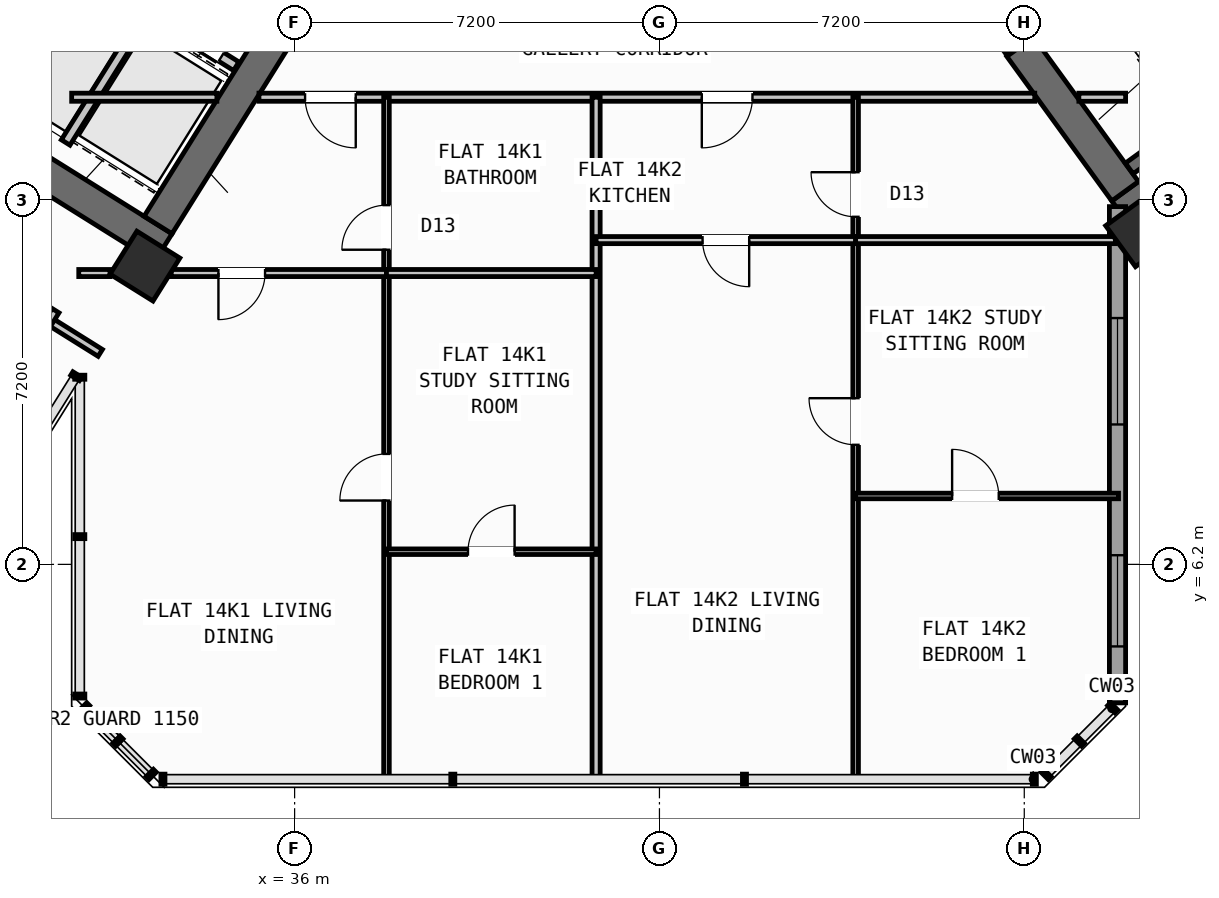
"""IFC4 building model, lengths in metres.
Left out: names, types, materials, properties, quantities, classifications, styles, units other than length and angle.
Written with IfcOpenShell. Run it as: python <this file> out.ifc"""

import sys

from ifc_helpers import new_model, si_unit, direction, frame, frame_2d, origin, origin_2d, place, context, subcontext, project, spatial, rectangle, hollow_rectangle, extrude, source, transform, mapped, element, fill, save


model = new_model("IFC4")
c1 = context("Model", 3, precision=1e-05, world=origin(), true_north=direction((0.0, 1.0)))
c2 = subcontext(c1, "Body", "Model", "MODEL_VIEW")
j1 = project(units=[si_unit("LENGTHUNIT", "METRE"), si_unit("PLANEANGLEUNIT", "RADIAN")], contexts=[c1])
p1 = place(None, origin())
s1 = spatial("IfcSite", under=j1, at=p1, CompositionType="ELEMENT")
p2 = place(p1, origin())
s2 = spatial("IfcBuilding", under=s1, at=p2, CompositionType="ELEMENT")
p3 = place(p2, frame((0.0, 0.0, 56.4)))
s3 = spatial("IfcBuildingStorey", under=s2, at=p3, CompositionType="ELEMENT", Elevation=56.4)
p4 = place(p3, frame((33.409, 12.45, 0.0), z_axis=(0.0, 0.0, 1.0), x_axis=(-0.848051132073, 0.529914405721, 0.0)))
e1 = element("IfcWall", 1, at=p4, inside=s3, PredefinedType="SHEAR", context=c2, shape_type="SweptSolid", body=[
    extrude(rectangle(XDim=13.24, YDim=0.65, at=frame_2d((6.62, 0.0))), origin(), (0.0, 0.0, 1.0), 3.35),
])
p5 = place(p3, frame((36.683, 18.304, 0.0), z_axis=(0.0, 0.0, 1.0), x_axis=(-0.529899109053, -0.848060690178, 0.0)))
e2 = element("IfcWall", 2, at=p5, inside=s3, PredefinedType="SHEAR", context=c2, shape_type="SweptSolid", body=[
    extrude(rectangle(XDim=6.375, YDim=0.65, at=frame_2d((3.188, 0.0))), origin(), (0.0, 0.0, 1.0), 3.35),
])
p6 = place(p3, frame((52.318, 13.11, 0.0), z_axis=(0.0, 0.0, 1.0), x_axis=(0.809019445368, 0.587781878776, 0.0)))
e3 = element("IfcWall", 3, at=p6, inside=s3, PredefinedType="SHEAR", context=c2, shape_type="SweptSolid", body=[
    extrude(rectangle(XDim=12.44, YDim=0.65, at=frame_2d((6.22, 0.0))), origin(), (0.0, 0.0, 1.0), 3.35),
])
p7 = place(p3, frame((52.39, 13.564, 0.0), z_axis=(0.0, 0.0, 1.0), x_axis=(-0.58779688989, 0.809008539037, 0.0)))
e4 = element("IfcWall", 4, at=p7, inside=s3, PredefinedType="SHEAR", context=c2, shape_type="SweptSolid", body=[
    extrude(rectangle(XDim=3.525, YDim=0.65, at=frame_2d((1.763, 0.0))), origin(), (0.0, 0.0, 1.0), 3.35),
])
m1 = source(origin(), c2, "Body", "SweptSolid", [
    extrude(hollow_rectangle(XDim=1.0, YDim=1.0, WallThickness=0.04, at=origin_2d()), origin(), (0.0, 0.0, 1.0), 3.6),
])
for number, where, z_axis, x_axis in (
    (5, (33.046, 12.087, 0.0), (0.0, 0.0, 1.0), (-0.848, 0.53, 0.0)),
    (6, (52.705, 12.773, 0.0), (0.0, 0.0, 1.0), (0.809, 0.588, 0.0)),
):
    element("IfcColumn", number, at=place(p3, frame(where, z_axis=z_axis, x_axis=x_axis)), inside=s3, PredefinedType="COLUMN", context=c2, shape_type="MappedRepresentation", body=[
        mapped(m1, transform((0.0, 0.0, 0.0), scale=1.0)),
    ])
p8 = place(p3, frame((56.581, 7.439, 0.0), z_axis=(0.0, 0.0, 1.0), x_axis=(-0.587785875463, 0.809016541614, 0.0)))
e7 = element("IfcWall", 7, at=p8, inside=s3, PredefinedType="STANDARD", context=c2, shape_type="SweptSolid", body=[
    extrude(rectangle(XDim=6.774, YDim=0.32, at=frame_2d((3.387, 0.0))), origin(), (0.0, 0.0, 1.0), 2.725),
])
p9 = place(p8, frame((1.556, 0.0, 0.8)))
e8 = element("IfcOpeningElement", 8, at=p9, cuts=e7, PredefinedType="OPENING", context=c2, shape_type="SweptSolid", body=[
    extrude(rectangle(XDim=2.1, YDim=1.55, at=frame_2d((1.05, 0.775))), frame((0.0, 0.17, 0.0), z_axis=(0.0, -1.0, 0.0), x_axis=(1.0, 0.0, 0.0)), (0.0, 0.0, 1.0), 0.34),
])
p10 = place(p3, frame((52.24, 13.261, 0.0), z_axis=(0.0, 0.0, 1.0), x_axis=(0.0, -1.0, 0.0)))
e9 = element("IfcWall", 9, at=p10, inside=s3, PredefinedType="STANDARD", context=c2, shape_type="SweptSolid", body=[
    extrude(rectangle(XDim=9.795, YDim=0.32, at=frame_2d((4.897, 0.0))), origin(), (0.0, 0.0, 1.0), 3.35),
])
p11 = place(p10, frame((2.199, 0.0, 0.8)))
e10 = element("IfcOpeningElement", 10, at=p11, cuts=e9, PredefinedType="OPENING", context=c2, shape_type="SweptSolid", body=[
    extrude(rectangle(XDim=2.1, YDim=1.55, at=frame_2d((1.05, 0.775))), frame((0.0, 0.17, 0.0), z_axis=(0.0, -1.0, 0.0), x_axis=(1.0, 0.0, 0.0)), (0.0, 0.0, 1.0), 0.34),
])
p12 = place(p10, frame((6.88, 0.0, 0.85)))
e11 = element("IfcOpeningElement", 11, at=p12, cuts=e9, PredefinedType="OPENING", context=c2, shape_type="SweptSolid", body=[
    extrude(rectangle(XDim=1.8, YDim=1.5, at=frame_2d((0.9, 0.75))), frame((0.0, 0.17, 0.0), z_axis=(0.0, -1.0, 0.0), x_axis=(1.0, 0.0, 0.0)), (0.0, 0.0, 1.0), 0.34),
])
p13 = place(p3, frame((31.288, 18.256, 0.0), z_axis=(0.0, 0.0, 1.0), x_axis=(-0.529943379326, -0.848033026897, 0.0)))
e12 = element("IfcWall", 12, at=p13, inside=s3, PredefinedType="SHEAR", context=c2, shape_type="SweptSolid", body=[
    extrude(rectangle(XDim=3.16, YDim=0.26, at=frame_2d((1.58, 0.0))), origin(), (0.0, 0.0, 1.0), 3.35),
])
p14 = place(p3, frame((34.848, 16.031, 0.0), z_axis=(0.0, 0.0, 1.0), x_axis=(-0.848044042236, 0.529925751807, 0.0)))
e13 = element("IfcWall", 13, at=p14, inside=s3, PredefinedType="STANDARD", context=c2, shape_type="SweptSolid", body=[
    extrude(rectangle(XDim=4.198, YDim=0.2, at=frame_2d((2.099, 0.0))), origin(), (0.0, 0.0, 1.0), 3.34),
])
p15 = place(p14, frame((0.348, 0.0, 0.0)))
e14 = element("IfcOpeningElement", 14, at=p15, cuts=e13, PredefinedType="OPENING", context=c2, shape_type="SweptSolid", body=[
    extrude(rectangle(XDim=1.3, YDim=2.2, at=frame_2d((0.65, 1.1))), frame((0.0, 0.11, 0.0), z_axis=(0.0, -1.0, 0.0), x_axis=(1.0, 0.0, 0.0)), (0.0, 0.0, 1.0), 0.22),
])
p16 = place(p14, frame((2.423, 0.0, 0.0)))
e15 = element("IfcOpeningElement", 15, at=p16, cuts=e13, PredefinedType="OPENING", context=c2, shape_type="SweptSolid", body=[
    extrude(rectangle(XDim=1.45, YDim=2.25, at=frame_2d((0.725, 1.125))), frame((0.0, 0.11, 0.0), z_axis=(0.0, -1.0, 0.0), x_axis=(1.0, 0.0, 0.0)), (0.0, 0.0, 1.0), 0.22),
])
p17 = place(p3, frame((33.029, 17.003, 0.0), z_axis=(0.0, 0.0, 1.0), x_axis=(-0.529916267533, -0.848049968695, 0.0)))
e16 = element("IfcWall", 16, at=p17, inside=s3, PredefinedType="STANDARD", context=c2, shape_type="SweptSolid", body=[
    extrude(rectangle(XDim=2.92, YDim=0.2, at=frame_2d((1.46, 0.0))), origin(), (0.0, 0.0, 1.0), 3.34),
])
p18 = place(p3, frame((52.472, 14.013, 0.0), z_axis=(0.0, 0.0, 1.0), x_axis=(0.809028366311, 0.587769599847, 0.0)))
e17 = element("IfcWall", 17, at=p18, inside=s3, PredefinedType="SHEAR", context=c2, shape_type="SweptSolid", body=[
    extrude(rectangle(XDim=7.33, YDim=0.26, at=frame_2d((3.665, 0.0))), origin(), (0.0, 0.0, 1.0), 3.35),
])
p19 = place(p3, frame((32.164, 10.374, 0.0), z_axis=(0.0, 0.0, 1.0), x_axis=(-0.848044107957, 0.529925646633, 0.0)))
e18 = element("IfcWall", 18, at=p19, inside=s3, PredefinedType="PARTITIONING", context=c2, shape_type="SweptSolid", body=[
    extrude(rectangle(XDim=15.57, YDim=0.16, at=frame_2d((7.785, 0.0))), origin(), (0.0, 0.0, 1.0), 3.34),
])
p20 = place(p19, frame((10.83, 0.0, 0.0)))
e19 = element("IfcOpeningElement", 19, at=p20, cuts=e18, PredefinedType="OPENING", context=c2, shape_type="SweptSolid", body=[
    extrude(rectangle(XDim=1.0, YDim=2.1, at=frame_2d((0.5, 1.05))), frame((0.0, 0.09, 0.0), z_axis=(0.0, -1.0, 0.0), x_axis=(1.0, 0.0, 0.0)), (0.0, 0.0, 1.0), 0.18),
])
p21 = place(p3, frame((31.282, 11.208, 0.0), z_axis=(0.0, 0.0, 1.0), x_axis=(-0.529938869374, -0.84803584519, 0.0)))
e20 = element("IfcWall", 20, at=p21, inside=s3, PredefinedType="PARTITIONING", context=c2, shape_type="SweptSolid", body=[
    extrude(rectangle(XDim=5.48, YDim=0.16, at=frame_2d((2.74, 0.0))), origin(), (0.0, 0.0, 1.0), 3.34),
])
p22 = place(p3, frame((31.6, 15.42, 0.0), z_axis=(0.0, 0.0, 1.0), x_axis=(1.0, 0.0, 0.0)))
e21 = element("IfcWall", 21, at=p22, inside=s3, PredefinedType="PARTITIONING", context=c2, shape_type="SweptSolid", body=[
    extrude(rectangle(XDim=2.866, YDim=0.16, at=frame_2d((1.433, 0.0))), origin(), (0.0, 0.0, 1.0), 3.34),
])
p23 = place(p3, frame((35.296, 15.42, 0.0), z_axis=(0.0, 0.0, 1.0), x_axis=(1.0, 0.0, 0.0)))
e22 = element("IfcWall", 22, at=p23, inside=s3, PredefinedType="PARTITIONING", context=c2, shape_type="SweptSolid", body=[
    extrude(rectangle(XDim=15.311, YDim=0.16, at=frame_2d((7.655, 0.0))), origin(), (0.0, 0.0, 1.0), 3.34),
])
p24 = place(p23, frame((0.91, 0.0, 0.0)))
e23 = element("IfcOpeningElement", 23, at=p24, cuts=e22, PredefinedType="OPENING", context=c2, shape_type="SweptSolid", body=[
    extrude(rectangle(XDim=1.0, YDim=2.1, at=frame_2d((0.5, 1.05))), frame((0.0, 0.09, 0.0), z_axis=(0.0, -1.0, 0.0), x_axis=(1.0, 0.0, 0.0)), (0.0, 0.0, 1.0), 0.18),
])
p25 = place(p23, frame((8.74, 0.0, 0.0)))
e24 = element("IfcOpeningElement", 24, at=p25, cuts=e22, PredefinedType="OPENING", context=c2, shape_type="SweptSolid", body=[
    extrude(rectangle(XDim=1.0, YDim=2.1, at=frame_2d((0.5, 1.05))), frame((0.0, 0.09, 0.0), z_axis=(0.0, -1.0, 0.0), x_axis=(1.0, 0.0, 0.0)), (0.0, 0.0, 1.0), 0.18),
])
p26 = place(p3, frame((51.477, 15.42, 0.0), z_axis=(0.0, 0.0, 1.0), x_axis=(1.0, 0.0, 0.0)))
e25 = element("IfcWall", 25, at=p26, inside=s3, PredefinedType="PARTITIONING", context=c2, shape_type="SweptSolid", body=[
    extrude(rectangle(XDim=0.923, YDim=0.16, at=frame_2d((0.461, 0.0))), origin(), (0.0, 0.0, 1.0), 3.34),
])
p27 = place(p3, frame((50.119, 16.333, 0.0), z_axis=(0.0, 0.0, 1.0), x_axis=(-0.587749856981, 0.809042709391, 0.0)))
e26 = element("IfcWall", 26, at=p27, inside=s3, PredefinedType="STANDARD", context=c2, shape_type="SweptSolid", body=[
    extrude(rectangle(XDim=2.96, YDim=0.2, at=frame_2d((1.48, 0.0))), origin(), (0.0, 0.0, 1.0), 3.34),
])
p28 = place(p27, frame((0.53, 0.0, 0.0)))
e27 = element("IfcOpeningElement", 27, at=p28, cuts=e26, PredefinedType="OPENING", context=c2, shape_type="SweptSolid", body=[
    extrude(rectangle(XDim=1.5, YDim=2.15, at=frame_2d((0.75, 1.075))), frame((0.0, 0.11, 0.0), z_axis=(0.0, -1.0, 0.0), x_axis=(1.0, 0.0, 0.0)), (0.0, 0.0, 1.0), 0.22),
])
p29 = place(p3, frame((41.95, 1.96, 0.0), z_axis=(0.0, 0.0, 1.0), x_axis=(0.0, 1.0, 0.0)))
e28 = element("IfcWall", 28, at=p29, inside=s3, PredefinedType="PARTITIONING", context=c2, shape_type="SweptSolid", body=[
    extrude(rectangle(XDim=13.46, YDim=0.16, at=frame_2d((6.73, 0.0))), origin(), (0.0, 0.0, 1.0), 3.34),
])
p30 = place(p3, frame((37.813, 1.96, 0.0), z_axis=(0.0, 0.0, 1.0), x_axis=(0.0, 1.0, 0.0)))
e29 = element("IfcWall", 29, at=p30, inside=s3, PredefinedType="PARTITIONING", context=c2, shape_type="SweptSolid", body=[
    extrude(rectangle(XDim=13.46, YDim=0.11, at=frame_2d((6.73, 0.0))), origin(), (0.0, 0.0, 1.0), 3.34),
])
p31 = place(p30, frame((5.5, 0.0, 0.0)))
e30 = element("IfcOpeningElement", 30, at=p31, cuts=e29, PredefinedType="OPENING", context=c2, shape_type="SweptSolid", body=[
    extrude(rectangle(XDim=0.92, YDim=2.08, at=frame_2d((0.46, 1.04))), frame((0.0, 0.065, 0.0), z_axis=(0.0, -1.0, 0.0), x_axis=(1.0, 0.0, 0.0)), (0.0, 0.0, 1.0), 0.13),
])
p32 = place(p30, frame((10.45, 0.0, 0.0)))
e31 = element("IfcOpeningElement", 31, at=p32, cuts=e29, PredefinedType="OPENING", context=c2, shape_type="SweptSolid", body=[
    extrude(rectangle(XDim=0.88, YDim=2.08, at=frame_2d((0.44, 1.04))), frame((0.0, 0.065, 0.0), z_axis=(0.0, -1.0, 0.0), x_axis=(1.0, 0.0, 0.0)), (0.0, 0.0, 1.0), 0.13),
])
p33 = place(p3, frame((31.74, 11.95, 0.0), z_axis=(0.0, 0.0, 1.0), x_axis=(1.0, 0.0, 0.0)))
e32 = element("IfcWall", 32, at=p33, inside=s3, PredefinedType="PLUMBINGWALL", context=c2, shape_type="SweptSolid", body=[
    extrude(rectangle(XDim=0.617, YDim=0.14, at=frame_2d((0.309, 0.0))), origin(), (0.0, 0.0, 1.0), 3.34),
])
p34 = place(p3, frame((33.564, 11.95, 0.0), z_axis=(0.0, 0.0, 1.0), x_axis=(1.0, 0.0, 0.0)))
e33 = element("IfcWall", 33, at=p34, inside=s3, PredefinedType="PLUMBINGWALL", context=c2, shape_type="SweptSolid", body=[
    extrude(rectangle(XDim=4.249, YDim=0.14, at=frame_2d((2.124, 0.0))), origin(), (0.0, 0.0, 1.0), 2.525),
])
p35 = place(p34, frame((0.932, 0.0, 0.0)))
e34 = element("IfcOpeningElement", 34, at=p35, cuts=e33, PredefinedType="OPENING", context=c2, shape_type="SweptSolid", body=[
    extrude(rectangle(XDim=0.92, YDim=2.08, at=frame_2d((0.46, 1.04))), frame((0.0, 0.08, 0.0), z_axis=(0.0, -1.0, 0.0), x_axis=(1.0, 0.0, 0.0)), (0.0, 0.0, 1.0), 0.16),
])
p36 = place(p3, frame((37.813, 11.95, 0.0), z_axis=(0.0, 0.0, 1.0), x_axis=(1.0, 0.0, 0.0)))
e35 = element("IfcWall", 35, at=p36, inside=s3, PredefinedType="PLUMBINGWALL", context=c2, shape_type="SweptSolid", body=[
    extrude(rectangle(XDim=4.137, YDim=0.14, at=frame_2d((2.068, 0.0))), origin(), (0.0, 0.0, 1.0), 2.525),
])
p37 = place(p3, frame((37.813, 6.45, 0.0), z_axis=(0.0, 0.0, 1.0), x_axis=(1.0, 0.0, 0.0)))
e36 = element("IfcWall", 36, at=p37, inside=s3, PredefinedType="PARTITIONING", context=c2, shape_type="SweptSolid", body=[
    extrude(rectangle(XDim=4.137, YDim=0.11, at=frame_2d((2.068, 0.0))), origin(), (0.0, 0.0, 1.0), 3.34),
])
p38 = place(p37, frame((1.608, 0.0, 0.0)))
e37 = element("IfcOpeningElement", 37, at=p38, cuts=e36, PredefinedType="OPENING", context=c2, shape_type="SweptSolid", body=[
    extrude(rectangle(XDim=0.92, YDim=2.08, at=frame_2d((0.46, 1.04))), frame((0.0, 0.065, 0.0), z_axis=(0.0, -1.0, 0.0), x_axis=(1.0, 0.0, 0.0)), (0.0, 0.0, 1.0), 0.13),
])
p39 = place(p3, frame((47.072, 1.96, 0.0), z_axis=(0.0, 0.0, 1.0), x_axis=(0.0, 1.0, 0.0)))
e38 = element("IfcWall", 38, at=p39, inside=s3, PredefinedType="PARTITIONING", context=c2, shape_type="SweptSolid", body=[
    extrude(rectangle(XDim=13.46, YDim=0.11, at=frame_2d((6.73, 0.0))), origin(), (0.0, 0.0, 1.0), 3.34),
])
p40 = place(p39, frame((6.6, 0.0, 0.0)))
e39 = element("IfcOpeningElement", 39, at=p40, cuts=e38, PredefinedType="OPENING", context=c2, shape_type="SweptSolid", body=[
    extrude(rectangle(XDim=0.92, YDim=2.08, at=frame_2d((0.46, 1.04))), frame((0.0, 0.065, 0.0), z_axis=(0.0, -1.0, 0.0), x_axis=(1.0, 0.0, 0.0)), (0.0, 0.0, 1.0), 0.13),
])
p41 = place(p39, frame((11.1, 0.0, 0.0)))
e40 = element("IfcOpeningElement", 40, at=p41, cuts=e38, PredefinedType="OPENING", context=c2, shape_type="SweptSolid", body=[
    extrude(rectangle(XDim=0.88, YDim=2.08, at=frame_2d((0.44, 1.04))), frame((0.0, 0.065, 0.0), z_axis=(0.0, -1.0, 0.0), x_axis=(1.0, 0.0, 0.0)), (0.0, 0.0, 1.0), 0.13),
])
p42 = place(p3, frame((41.95, 12.6, 0.0), z_axis=(0.0, 0.0, 1.0), x_axis=(1.0, 0.0, 0.0)))
e41 = element("IfcWall", 41, at=p42, inside=s3, PredefinedType="PLUMBINGWALL", context=c2, shape_type="SweptSolid", body=[
    extrude(rectangle(XDim=5.122, YDim=0.14, at=frame_2d((2.561, 0.0))), origin(), (0.0, 0.0, 1.0), 2.525),
])
p43 = place(p42, frame((2.101, 0.0, 0.0)))
e42 = element("IfcOpeningElement", 42, at=p43, cuts=e41, PredefinedType="OPENING", context=c2, shape_type="SweptSolid", body=[
    extrude(rectangle(XDim=0.92, YDim=2.08, at=frame_2d((0.46, 1.04))), frame((0.0, 0.08, 0.0), z_axis=(0.0, -1.0, 0.0), x_axis=(1.0, 0.0, 0.0)), (0.0, 0.0, 1.0), 0.16),
])
p44 = place(p3, frame((47.072, 12.6, 0.0), z_axis=(0.0, 0.0, 1.0), x_axis=(1.0, 0.0, 0.0)))
e43 = element("IfcWall", 43, at=p44, inside=s3, PredefinedType="PLUMBINGWALL", context=c2, shape_type="SweptSolid", body=[
    extrude(rectangle(XDim=5.126, YDim=0.14, at=frame_2d((2.563, 0.0))), origin(), (0.0, 0.0, 1.0), 2.525),
])
p45 = place(p3, frame((47.072, 7.55, 0.0), z_axis=(0.0, 0.0, 1.0), x_axis=(1.0, 0.0, 0.0)))
e44 = element("IfcWall", 44, at=p45, inside=s3, PredefinedType="PARTITIONING", context=c2, shape_type="SweptSolid", body=[
    extrude(rectangle(XDim=5.188, YDim=0.11, at=frame_2d((2.594, 0.0))), origin(), (0.0, 0.0, 1.0), 3.34),
])
p46 = place(p45, frame((1.904, 0.0, 0.0)))
e45 = element("IfcOpeningElement", 45, at=p46, cuts=e44, PredefinedType="OPENING", context=c2, shape_type="SweptSolid", body=[
    extrude(rectangle(XDim=0.92, YDim=2.08, at=frame_2d((0.46, 1.04))), frame((0.0, 0.065, 0.0), z_axis=(0.0, -1.0, 0.0), x_axis=(1.0, 0.0, 0.0)), (0.0, 0.0, 1.0), 0.13),
])
m2 = source(origin(), c2, "Body", "SweptSolid", [
    extrude(rectangle(XDim=2.1, YDim=1.55, at=frame_2d((1.05, 0.775))), frame((0.0, 0.03, 0.0), z_axis=(0.0, -1.0, 0.0), x_axis=(1.0, 0.0, 0.0)), (0.0, 0.0, 1.0), 0.06),
])
p47 = place(p11, origin())
e46 = element("IfcWindow", 46, at=p47, inside=s3, PartitioningType="SINGLE_PANEL", PredefinedType="WINDOW", context=c2, shape_type="MappedRepresentation", body=[
    mapped(m2, transform((0.0, 0.0, 0.0), scale=1.0)),
])
fill(e10, e46)
m3 = source(origin(), c2, "Body", "SweptSolid", [
    extrude(rectangle(XDim=1.8, YDim=1.5, at=frame_2d((0.9, 0.75))), frame((0.0, 0.03, 0.0), z_axis=(0.0, -1.0, 0.0), x_axis=(1.0, 0.0, 0.0)), (0.0, 0.0, 1.0), 0.06),
])
p48 = place(p12, origin())
e47 = element("IfcWindow", 47, at=p48, inside=s3, PartitioningType="SINGLE_PANEL", PredefinedType="WINDOW", context=c2, shape_type="MappedRepresentation", body=[
    mapped(m3, transform((0.0, 0.0, 0.0), scale=1.0)),
])
fill(e11, e47)
m4 = source(origin(), c2, "Body", "SweptSolid", [
    extrude(rectangle(XDim=1.3, YDim=2.2, at=frame_2d((0.65, 1.1))), frame((0.0, 0.025, 0.0), z_axis=(0.0, -1.0, 0.0), x_axis=(1.0, 0.0, 0.0)), (0.0, 0.0, 1.0), 0.05),
])
p49 = place(p15, origin())
e48 = element("IfcDoor", 48, at=p49, inside=s3, OperationType="DOUBLE_DOOR_SLIDING", PredefinedType="DOOR", context=c2, shape_type="MappedRepresentation", body=[
    mapped(m4, transform((0.0, 0.0, 0.0), scale=1.0)),
])
fill(e14, e48)
m5 = source(origin(), c2, "Body", "SweptSolid", [
    extrude(rectangle(XDim=0.92, YDim=2.08, at=frame_2d((0.46, 1.04))), frame((0.0, 0.025, 0.0), z_axis=(0.0, -1.0, 0.0), x_axis=(1.0, 0.0, 0.0)), (0.0, 0.0, 1.0), 0.05),
])
p50 = place(p31, origin())
e49 = element("IfcDoor", 49, at=p50, inside=s3, OperationType="SINGLE_SWING_LEFT", PredefinedType="DOOR", context=c2, shape_type="MappedRepresentation", body=[
    mapped(m5, transform((0.0, 0.0, 0.0), scale=1.0)),
])
fill(e30, e49)
p51 = place(p38, origin())
e50 = element("IfcDoor", 50, at=p51, inside=s3, OperationType="SINGLE_SWING_RIGHT", PredefinedType="DOOR", context=c2, shape_type="MappedRepresentation", body=[
    mapped(m5, transform((0.0, 0.0, 0.0), scale=1.0)),
])
fill(e37, e50)
m6 = source(origin(), c2, "Body", "SweptSolid", [
    extrude(rectangle(XDim=1.0, YDim=2.1, at=frame_2d((0.5, 1.05))), frame((0.0, 0.025, 0.0), z_axis=(0.0, -1.0, 0.0), x_axis=(1.0, 0.0, 0.0)), (0.0, 0.0, 1.0), 0.05),
])
p52 = place(p24, frame((1.0, 0.0, 0.0), z_axis=(0.0, 0.0, 1.0), x_axis=(-1.0, 0.0, 0.0)))
e51 = element("IfcDoor", 51, at=p52, inside=s3, OperationType="SINGLE_SWING_LEFT", PredefinedType="DOOR", context=c2, shape_type="MappedRepresentation", body=[
    mapped(m6, transform((0.0, 0.0, 0.0), scale=1.0)),
])
fill(e23, e51)
p53 = place(p35, frame((0.92, 0.0, 0.0), z_axis=(0.0, 0.0, 1.0), x_axis=(-1.0, 0.0, 0.0)))
e52 = element("IfcDoor", 52, at=p53, inside=s3, OperationType="SINGLE_SWING_RIGHT", PredefinedType="DOOR", context=c2, shape_type="MappedRepresentation", body=[
    mapped(m5, transform((0.0, 0.0, 0.0), scale=1.0)),
])
fill(e34, e52)
m7 = source(origin(), c2, "Body", "SweptSolid", [
    extrude(rectangle(XDim=0.88, YDim=2.08, at=frame_2d((0.44, 1.04))), frame((0.0, 0.025, 0.0), z_axis=(0.0, -1.0, 0.0), x_axis=(1.0, 0.0, 0.0)), (0.0, 0.0, 1.0), 0.05),
])
p54 = place(p32, origin())
e53 = element("IfcDoor", 53, at=p54, inside=s3, OperationType="SINGLE_SWING_LEFT", PredefinedType="DOOR", context=c2, shape_type="MappedRepresentation", body=[
    mapped(m7, transform((0.0, 0.0, 0.0), scale=1.0)),
])
fill(e31, e53)
p55 = place(p40, origin())
e54 = element("IfcDoor", 54, at=p55, inside=s3, OperationType="SINGLE_SWING_RIGHT", PredefinedType="DOOR", context=c2, shape_type="MappedRepresentation", body=[
    mapped(m5, transform((0.0, 0.0, 0.0), scale=1.0)),
])
fill(e39, e54)
p56 = place(p46, origin())
e55 = element("IfcDoor", 55, at=p56, inside=s3, OperationType="SINGLE_SWING_LEFT", PredefinedType="DOOR", context=c2, shape_type="MappedRepresentation", body=[
    mapped(m5, transform((0.0, 0.0, 0.0), scale=1.0)),
])
fill(e45, e55)
p57 = place(p25, frame((1.0, 0.0, 0.0), z_axis=(0.0, 0.0, 1.0), x_axis=(-1.0, 0.0, 0.0)))
e56 = element("IfcDoor", 56, at=p57, inside=s3, OperationType="SINGLE_SWING_RIGHT", PredefinedType="DOOR", context=c2, shape_type="MappedRepresentation", body=[
    mapped(m6, transform((0.0, 0.0, 0.0), scale=1.0)),
])
fill(e24, e56)
p58 = place(p43, frame((0.92, 0.0, 0.0), z_axis=(0.0, 0.0, 1.0), x_axis=(-1.0, 0.0, 0.0)))
e57 = element("IfcDoor", 57, at=p58, inside=s3, OperationType="SINGLE_SWING_LEFT", PredefinedType="DOOR", context=c2, shape_type="MappedRepresentation", body=[
    mapped(m5, transform((0.0, 0.0, 0.0), scale=1.0)),
])
fill(e42, e57)
p59 = place(p41, origin())
e58 = element("IfcDoor", 58, at=p59, inside=s3, OperationType="SINGLE_SWING_RIGHT", PredefinedType="DOOR", context=c2, shape_type="MappedRepresentation", body=[
    mapped(m7, transform((0.0, 0.0, 0.0), scale=1.0)),
])
fill(e40, e58)
save(model, sys.argv[1])
